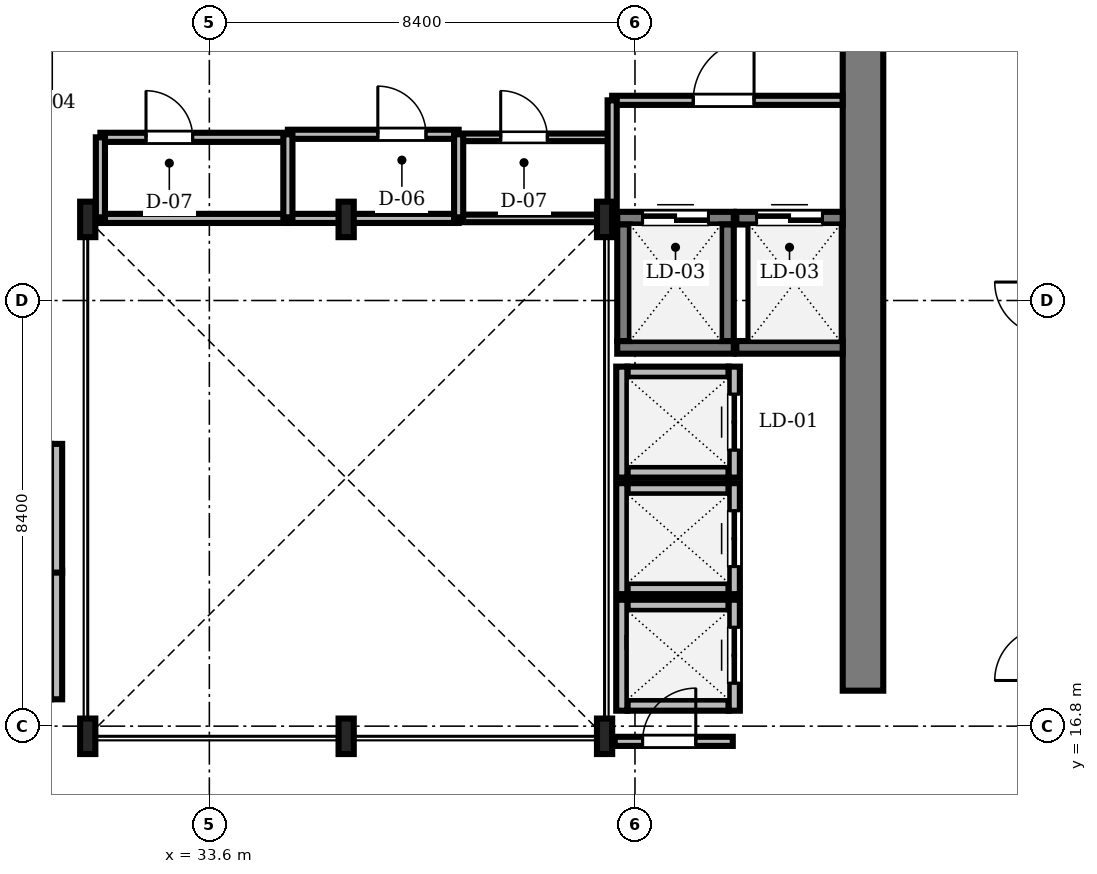
"""IFC4 building model, lengths in metres.
Left out: names, types, materials, properties, quantities, classifications, styles, units other than length and angle.
Written with IfcOpenShell. Run it as: python <this file> out.ifc"""

import sys

from ifc_helpers import new_model, si_unit, direction, frame, frame_2d, origin, origin_2d, place, context, subcontext, project, spatial, rectangle, i_section, extrude, source, transform, mapped, element, fill, save


model = new_model("IFC4")
c1 = context("Model", 3, precision=1e-05, world=origin(), true_north=direction((0.0, 1.0)))
c2 = subcontext(c1, "Body", "Model", "MODEL_VIEW")
j1 = project(units=[si_unit("LENGTHUNIT", "METRE"), si_unit("PLANEANGLEUNIT", "RADIAN")], contexts=[c1])
p1 = place(None, origin())
s1 = spatial("IfcSite", under=j1, at=p1, CompositionType="ELEMENT")
p2 = place(p1, origin())
s2 = spatial("IfcBuilding", under=s1, at=p2, CompositionType="ELEMENT")
p3 = place(p2, frame((0.0, 0.0, 229.8)))
s3 = spatial("IfcBuildingStorey", under=s2, at=p3, CompositionType="ELEMENT", Elevation=229.8)
m1 = source(origin(), c2, "Body", "SweptSolid", [
    extrude(rectangle(XDim=13.15, YDim=0.8, at=frame_2d((6.575, 0.0))), origin(), (0.0, 0.0, 1.0), 3.53),
])
p4 = place(p3, frame((46.5, 17.5, 0.0), z_axis=(0.0, 0.0, 1.0), x_axis=(0.0, 1.0, 0.0)))
e1 = element("IfcWall", 1, at=p4, inside=s3, PredefinedType="SHEAR", context=c2, shape_type="MappedRepresentation", body=[
    mapped(m1, transform((0.0, 0.0, 0.0), scale=1.0)),
])
m2 = source(origin(), c2, "Body", "SweptSolid", [
    extrude(i_section(OverallWidth=0.3, OverallDepth=0.7, WebThickness=0.017, FlangeThickness=0.032, FilletRadius=0.027, at=origin_2d()), origin(), (0.0, 0.0, 1.0), 3.53),
])
for number, where, z_axis, x_axis in (
    (2, (31.2, 16.6, 0.0), (0.0, 0.0, 1.0), (1.0, 0.0, 0.0)),
    (3, (36.3, 16.6, 0.0), (0.0, 0.0, 1.0), (1.0, 0.0, 0.0)),
    (4, (41.4, 16.6, 0.0), (0.0, 0.0, 1.0), (1.0, 0.0, 0.0)),
    (5, (41.4, 26.8, 0.0), (0.0, 0.0, 1.0), (1.0, 0.0, 0.0)),
    (6, (36.3, 26.8, 0.0), (0.0, 0.0, 1.0), (1.0, 0.0, 0.0)),
    (7, (31.2, 26.8, 0.0), (0.0, 0.0, 1.0), (1.0, 0.0, 0.0)),
):
    element("IfcColumn", number, at=place(p3, frame(where, z_axis=z_axis, x_axis=x_axis)), inside=s3, PredefinedType="COLUMN", context=c2, shape_type="MappedRepresentation", body=[
        mapped(m2, transform((0.0, 0.0, 0.0), scale=1.0)),
    ])
m3 = source(origin(), c2, "Body", "SweptSolid", [
    extrude(rectangle(XDim=2.0, YDim=0.22, at=frame_2d((1.0, 0.0))), origin(), (0.0, 0.0, 1.0), 3.53),
])
for number, where, z_axis, x_axis in (
    (8, (41.85, 21.815, 0.0), (0.0, 0.0, 1.0), (1.0, 0.0, 0.0)),
    (9, (41.85, 23.785, 0.0), (0.0, 0.0, 1.0), (1.0, 0.0, 0.0)),
):
    element("IfcWall", number, at=place(p3, frame(where, z_axis=z_axis, x_axis=x_axis)), inside=s3, PredefinedType="SOLIDWALL", context=c2, shape_type="MappedRepresentation", body=[
        mapped(m3, transform((0.0, 0.0, 0.0), scale=1.0)),
    ])
m4 = source(origin(), c2, "Body", "SweptSolid", [
    extrude(rectangle(XDim=2.19, YDim=0.22, at=frame_2d((1.095, 0.0))), origin(), (0.0, 0.0, 1.0), 3.53),
])
p5 = place(p3, frame((41.74, 21.705, 0.0), z_axis=(0.0, 0.0, 1.0), x_axis=(0.0, 1.0, 0.0)))
e10 = element("IfcWall", 10, at=p5, inside=s3, PredefinedType="SOLIDWALL", context=c2, shape_type="MappedRepresentation", body=[
    mapped(m4, transform((0.0, 0.0, 0.0), scale=1.0)),
])
p6 = place(p3, frame((43.96, 21.705, 0.0), z_axis=(0.0, 0.0, 1.0), x_axis=(0.0, 1.0, 0.0)))
e11 = element("IfcWall", 11, at=p6, inside=s3, PredefinedType="SOLIDWALL", context=c2, shape_type="MappedRepresentation", body=[
    mapped(m4, transform((0.0, 0.0, 0.0), scale=1.0)),
])
m5 = source(origin(), c2, "Body", "SweptSolid", [
    extrude(rectangle(XDim=1.1, YDim=2.2, at=frame_2d((0.55, 1.1))), frame((0.0, 0.12, 0.0), z_axis=(0.0, -1.0, 0.0), x_axis=(1.0, 0.0, 0.0)), (0.0, 0.0, 1.0), 0.24),
])
p7 = place(p6, frame((0.545, 0.0, 0.0)))
e12 = element("IfcOpeningElement", 12, at=p7, cuts=e11, PredefinedType="OPENING", context=c2, shape_type="MappedRepresentation", body=[
    mapped(m5, transform((0.0, 0.0, 0.0), scale=1.0)),
])
for number, where, z_axis, x_axis in (
    (13, (41.85, 19.515, 0.0), (0.0, 0.0, 1.0), (1.0, 0.0, 0.0)),
    (14, (41.85, 21.485, 0.0), (0.0, 0.0, 1.0), (1.0, 0.0, 0.0)),
):
    element("IfcWall", number, at=place(p3, frame(where, z_axis=z_axis, x_axis=x_axis)), inside=s3, PredefinedType="SOLIDWALL", context=c2, shape_type="MappedRepresentation", body=[
        mapped(m3, transform((0.0, 0.0, 0.0), scale=1.0)),
    ])
p8 = place(p3, frame((41.74, 19.405, 0.0), z_axis=(0.0, 0.0, 1.0), x_axis=(0.0, 1.0, 0.0)))
e15 = element("IfcWall", 15, at=p8, inside=s3, PredefinedType="SOLIDWALL", context=c2, shape_type="MappedRepresentation", body=[
    mapped(m4, transform((0.0, 0.0, 0.0), scale=1.0)),
])
p9 = place(p3, frame((43.96, 19.405, 0.0), z_axis=(0.0, 0.0, 1.0), x_axis=(0.0, 1.0, 0.0)))
e16 = element("IfcWall", 16, at=p9, inside=s3, PredefinedType="SOLIDWALL", context=c2, shape_type="MappedRepresentation", body=[
    mapped(m4, transform((0.0, 0.0, 0.0), scale=1.0)),
])
p10 = place(p9, frame((0.545, 0.0, 0.0)))
e17 = element("IfcOpeningElement", 17, at=p10, cuts=e16, PredefinedType="OPENING", context=c2, shape_type="MappedRepresentation", body=[
    mapped(m5, transform((0.0, 0.0, 0.0), scale=1.0)),
])
for number, where, z_axis, x_axis in (
    (18, (41.85, 17.215, 0.0), (0.0, 0.0, 1.0), (1.0, 0.0, 0.0)),
    (19, (41.85, 19.185, 0.0), (0.0, 0.0, 1.0), (1.0, 0.0, 0.0)),
):
    element("IfcWall", number, at=place(p3, frame(where, z_axis=z_axis, x_axis=x_axis)), inside=s3, PredefinedType="SOLIDWALL", context=c2, shape_type="MappedRepresentation", body=[
        mapped(m3, transform((0.0, 0.0, 0.0), scale=1.0)),
    ])
p11 = place(p3, frame((41.74, 17.105, 0.0), z_axis=(0.0, 0.0, 1.0), x_axis=(0.0, 1.0, 0.0)))
e20 = element("IfcWall", 20, at=p11, inside=s3, PredefinedType="SOLIDWALL", context=c2, shape_type="MappedRepresentation", body=[
    mapped(m4, transform((0.0, 0.0, 0.0), scale=1.0)),
])
p12 = place(p3, frame((43.96, 17.105, 0.0), z_axis=(0.0, 0.0, 1.0), x_axis=(0.0, 1.0, 0.0)))
e21 = element("IfcWall", 21, at=p12, inside=s3, PredefinedType="SOLIDWALL", context=c2, shape_type="MappedRepresentation", body=[
    mapped(m4, transform((0.0, 0.0, 0.0), scale=1.0)),
])
p13 = place(p12, frame((0.545, 0.0, 0.0)))
e22 = element("IfcOpeningElement", 22, at=p13, cuts=e21, PredefinedType="OPENING", context=c2, shape_type="MappedRepresentation", body=[
    mapped(m5, transform((0.0, 0.0, 0.0), scale=1.0)),
])
m6 = source(origin(), c2, "Body", "SweptSolid", [
    extrude(rectangle(XDim=2.54, YDim=0.22, at=frame_2d((1.27, 0.0))), origin(), (0.0, 0.0, 1.0), 3.53),
])
for number, where, z_axis, x_axis in (
    (23, (30.585, 17.33, 0.0), (0.0, 0.0, 1.0), (0.0, 1.0, 0.0)),
    (24, (30.585, 19.83, 0.0), (0.0, 0.0, 1.0), (0.0, 1.0, 0.0)),
):
    element("IfcWall", number, at=place(p3, frame(where, z_axis=z_axis, x_axis=x_axis)), inside=s3, PredefinedType="SOLIDWALL", context=c2, shape_type="MappedRepresentation", body=[
        mapped(m6, transform((0.0, 0.0, 0.0), scale=1.0)),
    ])
m7 = source(origin(), c2, "Body", "SweptSolid", [
    extrude(rectangle(XDim=2.3, YDim=0.25, at=frame_2d((1.15, 0.0))), origin(), (0.0, 0.0, 1.0), 3.53),
])
p14 = place(p3, frame((41.65, 24.275, 0.0), z_axis=(0.0, 0.0, 1.0), x_axis=(1.0, 0.0, 0.0)))
e25 = element("IfcWall", 25, at=p14, inside=s3, PredefinedType="SOLIDWALL", context=c2, shape_type="MappedRepresentation", body=[
    mapped(m7, transform((0.0, 0.0, 0.0), scale=1.0)),
])
p15 = place(p3, frame((41.65, 26.825, 0.0), z_axis=(0.0, 0.0, 1.0), x_axis=(1.0, 0.0, 0.0)))
e26 = element("IfcWall", 26, at=p15, inside=s3, PredefinedType="SOLIDWALL", context=c2, shape_type="MappedRepresentation", body=[
    mapped(m7, transform((0.0, 0.0, 0.0), scale=1.0)),
])
m8 = source(origin(), c2, "Body", "SweptSolid", [
    extrude(rectangle(XDim=1.3, YDim=2.3, at=frame_2d((0.65, 1.15))), frame((0.0, 0.135, 0.0), z_axis=(0.0, -1.0, 0.0), x_axis=(1.0, 0.0, 0.0)), (0.0, 0.0, 1.0), 0.27),
])
p16 = place(p15, frame((0.5, 0.0, 0.0)))
e27 = element("IfcOpeningElement", 27, at=p16, cuts=e26, PredefinedType="OPENING", context=c2, shape_type="MappedRepresentation", body=[
    mapped(m8, transform((0.0, 0.0, 0.0), scale=1.0)),
])
for number, where, z_axis, x_axis in (
    (28, (41.775, 24.4, 0.0), (0.0, 0.0, 1.0), (0.0, 1.0, 0.0)),
    (29, (43.825, 24.4, 0.0), (0.0, 0.0, 1.0), (0.0, 1.0, 0.0)),
):
    element("IfcWall", number, at=place(p3, frame(where, z_axis=z_axis, x_axis=x_axis)), inside=s3, PredefinedType="SOLIDWALL", context=c2, shape_type="MappedRepresentation", body=[
        mapped(m7, transform((0.0, 0.0, 0.0), scale=1.0)),
    ])
m9 = source(origin(), c2, "Body", "SweptSolid", [
    extrude(rectangle(XDim=2.1, YDim=0.25, at=frame_2d((1.05, 0.0))), origin(), (0.0, 0.0, 1.0), 3.53),
])
p17 = place(p3, frame((44.0, 24.275, 0.0), z_axis=(0.0, 0.0, 1.0), x_axis=(1.0, 0.0, 0.0)))
e30 = element("IfcWall", 30, at=p17, inside=s3, PredefinedType="SOLIDWALL", context=c2, shape_type="MappedRepresentation", body=[
    mapped(m9, transform((0.0, 0.0, 0.0), scale=1.0)),
])
p18 = place(p3, frame((44.0, 26.825, 0.0), z_axis=(0.0, 0.0, 1.0), x_axis=(1.0, 0.0, 0.0)))
e31 = element("IfcWall", 31, at=p18, inside=s3, PredefinedType="SOLIDWALL", context=c2, shape_type="MappedRepresentation", body=[
    mapped(m9, transform((0.0, 0.0, 0.0), scale=1.0)),
])
p19 = place(p18, frame((0.4, 0.0, 0.0)))
e32 = element("IfcOpeningElement", 32, at=p19, cuts=e31, PredefinedType="OPENING", context=c2, shape_type="MappedRepresentation", body=[
    mapped(m8, transform((0.0, 0.0, 0.0), scale=1.0)),
])
m10 = source(origin(), c2, "Body", "SweptSolid", [
    extrude(rectangle(XDim=4.548, YDim=0.18, at=frame_2d((2.274, 0.0))), origin(), (0.0, 0.0, 1.0), 3.162),
])
p20 = place(p3, frame((41.55, 29.15, 0.0), z_axis=(0.0, 0.0, 1.0), x_axis=(1.0, 0.0, 0.0)))
e33 = element("IfcWall", 33, at=p20, inside=s3, PredefinedType="PARTITIONING", context=c2, shape_type="MappedRepresentation", body=[
    mapped(m10, transform((0.0, 0.0, 0.0), scale=1.0)),
])
m11 = source(origin(), c2, "Body", "SweptSolid", [
    extrude(rectangle(XDim=1.2, YDim=2.2, at=frame_2d((0.6, 1.1))), frame((0.0, 0.1, 0.0), z_axis=(0.0, -1.0, 0.0), x_axis=(1.0, 0.0, 0.0)), (0.0, 0.0, 1.0), 0.2),
])
p21 = place(p20, frame((1.6, 0.0, 0.0)))
e34 = element("IfcOpeningElement", 34, at=p21, cuts=e33, PredefinedType="OPENING", context=c2, shape_type="MappedRepresentation", body=[
    mapped(m11, transform((0.0, 0.0, 0.0), scale=1.0)),
])
m12 = source(origin(), c2, "Body", "SweptSolid", [
    extrude(rectangle(XDim=3.7, YDim=0.18, at=frame_2d((1.85, 0.0))), origin(), (0.0, 0.0, 1.0), 3.162),
])
p22 = place(p3, frame((31.45, 28.42, 0.0), z_axis=(0.0, 0.0, 1.0), x_axis=(1.0, 0.0, 0.0)))
e35 = element("IfcWall", 35, at=p22, inside=s3, PredefinedType="PARTITIONING", context=c2, shape_type="MappedRepresentation", body=[
    mapped(m12, transform((0.0, 0.0, 0.0), scale=1.0)),
])
m13 = source(origin(), c2, "Body", "SweptSolid", [
    extrude(rectangle(XDim=0.92, YDim=2.1, at=frame_2d((0.46, 1.05))), frame((0.0, 0.1, 0.0), z_axis=(0.0, -1.0, 0.0), x_axis=(1.0, 0.0, 0.0)), (0.0, 0.0, 1.0), 0.2),
])
p23 = place(p22, frame((0.9, 0.0, 0.0)))
e36 = element("IfcOpeningElement", 36, at=p23, cuts=e35, PredefinedType="OPENING", context=c2, shape_type="MappedRepresentation", body=[
    mapped(m13, transform((0.0, 0.0, 0.0), scale=1.0)),
])
m14 = source(origin(), c2, "Body", "SweptSolid", [
    extrude(rectangle(XDim=3.37, YDim=0.18, at=frame_2d((1.685, 0.0))), origin(), (0.0, 0.0, 1.0), 3.53),
])
p24 = place(p3, frame((35.15, 28.48, 0.0), z_axis=(0.0, 0.0, 1.0), x_axis=(1.0, 0.0, 0.0)))
e37 = element("IfcWall", 37, at=p24, inside=s3, PredefinedType="PARTITIONING", context=c2, shape_type="MappedRepresentation", body=[
    mapped(m14, transform((0.0, 0.0, 0.0), scale=1.0)),
])
m15 = source(origin(), c2, "Body", "SweptSolid", [
    extrude(rectangle(XDim=0.95, YDim=2.15, at=frame_2d((0.475, 1.075))), frame((0.0, 0.1, 0.0), z_axis=(0.0, -1.0, 0.0), x_axis=(1.0, 0.0, 0.0)), (0.0, 0.0, 1.0), 0.2),
])
p25 = place(p24, frame((1.775, 0.0, 0.0)))
e38 = element("IfcOpeningElement", 38, at=p25, cuts=e37, PredefinedType="OPENING", context=c2, shape_type="MappedRepresentation", body=[
    mapped(m15, transform((0.0, 0.0, 0.0), scale=1.0)),
])
m16 = source(origin(), c2, "Body", "SweptSolid", [
    extrude(rectangle(XDim=3.0, YDim=0.15, at=frame_2d((1.5, 0.0))), origin(), (0.0, 0.0, 1.0), 3.53),
])
p26 = place(p3, frame((38.52, 28.42, 0.0), z_axis=(0.0, 0.0, 1.0), x_axis=(1.0, 0.0, 0.0)))
e39 = element("IfcWall", 39, at=p26, inside=s3, PredefinedType="PARTITIONING", context=c2, shape_type="MappedRepresentation", body=[
    mapped(m16, transform((0.0, 0.0, 0.0), scale=1.0)),
])
m17 = source(origin(), c2, "Body", "SweptSolid", [
    extrude(rectangle(XDim=0.92, YDim=2.1, at=frame_2d((0.46, 1.05))), frame((0.0, 0.085, 0.0), z_axis=(0.0, -1.0, 0.0), x_axis=(1.0, 0.0, 0.0)), (0.0, 0.0, 1.0), 0.17),
])
p27 = place(p26, frame((0.83, 0.0, 0.0)))
e40 = element("IfcOpeningElement", 40, at=p27, cuts=e39, PredefinedType="OPENING", context=c2, shape_type="MappedRepresentation", body=[
    mapped(m17, transform((0.0, 0.0, 0.0), scale=1.0)),
])
m18 = source(origin(), c2, "Body", "SweptSolid", [
    extrude(rectangle(XDim=2.33, YDim=0.18, at=frame_2d((1.165, 0.0))), origin(), (0.0, 0.0, 1.0), 2.972),
])
p28 = place(p3, frame((41.6, 16.5, 0.0), z_axis=(0.0, 0.0, 1.0), x_axis=(1.0, 0.0, 0.0)))
e41 = element("IfcWall", 41, at=p28, inside=s3, PredefinedType="PARTITIONING", context=c2, shape_type="MappedRepresentation", body=[
    mapped(m18, transform((0.0, 0.0, 0.0), scale=1.0)),
])
m19 = source(origin(), c2, "Body", "SweptSolid", [
    extrude(rectangle(XDim=1.05, YDim=2.2, at=frame_2d((0.525, 1.1))), frame((0.0, 0.1, 0.0), z_axis=(0.0, -1.0, 0.0), x_axis=(1.0, 0.0, 0.0)), (0.0, 0.0, 1.0), 0.2),
])
p29 = place(p28, frame((0.55, 0.0, 0.0)))
e42 = element("IfcOpeningElement", 42, at=p29, cuts=e41, PredefinedType="OPENING", context=c2, shape_type="MappedRepresentation", body=[
    mapped(m19, transform((0.0, 0.0, 0.0), scale=1.0)),
])
m20 = source(origin(), c2, "Body", "SweptSolid", [
    extrude(rectangle(XDim=3.7, YDim=0.18, at=frame_2d((1.85, 0.0))), origin(), (0.0, 0.0, 1.0), 3.072),
])
p30 = place(p3, frame((31.45, 26.82, 0.0), z_axis=(0.0, 0.0, 1.0), x_axis=(1.0, 0.0, 0.0)))
e43 = element("IfcWall", 43, at=p30, inside=s3, PredefinedType="PARTITIONING", context=c2, shape_type="MappedRepresentation", body=[
    mapped(m20, transform((0.0, 0.0, 0.0), scale=1.0)),
])
m21 = source(origin(), c2, "Body", "SweptSolid", [
    extrude(rectangle(XDim=3.37, YDim=0.18, at=frame_2d((1.685, 0.0))), origin(), (0.0, 0.0, 1.0), 3.072),
])
p31 = place(p3, frame((35.15, 26.82, 0.0), z_axis=(0.0, 0.0, 1.0), x_axis=(1.0, 0.0, 0.0)))
e44 = element("IfcWall", 44, at=p31, inside=s3, PredefinedType="PARTITIONING", context=c2, shape_type="MappedRepresentation", body=[
    mapped(m21, transform((0.0, 0.0, 0.0), scale=1.0)),
])
m22 = source(origin(), c2, "Body", "SweptSolid", [
    extrude(rectangle(XDim=3.0, YDim=0.15, at=frame_2d((1.5, 0.0))), origin(), (0.0, 0.0, 1.0), 2.972),
])
p32 = place(p3, frame((38.52, 26.82, 0.0), z_axis=(0.0, 0.0, 1.0), x_axis=(1.0, 0.0, 0.0)))
e45 = element("IfcWall", 45, at=p32, inside=s3, PredefinedType="PARTITIONING", context=c2, shape_type="MappedRepresentation", body=[
    mapped(m22, transform((0.0, 0.0, 0.0), scale=1.0)),
])
m23 = source(origin(), c2, "Body", "SweptSolid", [
    extrude(rectangle(XDim=2.35, YDim=0.18, at=frame_2d((1.175, 0.0))), origin(), (0.0, 0.0, 1.0), 2.972),
])
p33 = place(p3, frame((41.55, 26.8, 0.0), z_axis=(0.0, 0.0, 1.0), x_axis=(0.0, 1.0, 0.0)))
e46 = element("IfcWall", 46, at=p33, inside=s3, PredefinedType="PARTITIONING", context=c2, shape_type="MappedRepresentation", body=[
    mapped(m23, transform((0.0, 0.0, 0.0), scale=1.0)),
])
m24 = source(origin(), c2, "Body", "SweptSolid", [
    extrude(rectangle(XDim=1.858, YDim=0.18, at=frame_2d((0.929, 0.0))), origin(), (0.0, 0.0, 1.0), 3.53),
])
p34 = place(p3, frame((41.852, 18.45, 0.0), z_axis=(0.0, 0.0, 1.0), x_axis=(1.0, 0.0, 0.0)))
e47 = element("IfcWall", 47, at=p34, inside=s3, PredefinedType="PARTITIONING", context=c2, shape_type="MappedRepresentation", body=[
    mapped(m24, transform((0.0, 0.0, 0.0), scale=1.0)),
])
m25 = source(origin(), c2, "Body", "SweptSolid", [
    extrude(rectangle(XDim=1.66, YDim=0.18, at=frame_2d((0.83, 0.0))), origin(), (0.0, 0.0, 1.0), 3.072),
])
for number, where, z_axis, x_axis in (
    (48, (35.15, 26.82, 0.0), (0.0, 0.0, 1.0), (0.0, 1.0, 0.0)),
    (49, (38.52, 26.82, 0.0), (0.0, 0.0, 1.0), (0.0, 1.0, 0.0)),
):
    element("IfcWall", number, at=place(p3, frame(where, z_axis=z_axis, x_axis=x_axis)), inside=s3, PredefinedType="PARTITIONING", context=c2, shape_type="MappedRepresentation", body=[
        mapped(m25, transform((0.0, 0.0, 0.0), scale=1.0)),
    ])
m26 = source(origin(), c2, "Body", "SweptSolid", [
    extrude(rectangle(XDim=1.6, YDim=0.18, at=frame_2d((0.8, 0.0))), origin(), (0.0, 0.0, 1.0), 3.072),
])
p35 = place(p3, frame((31.45, 26.82, 0.0), z_axis=(0.0, 0.0, 1.0), x_axis=(0.0, 1.0, 0.0)))
e50 = element("IfcWall", 50, at=p35, inside=s3, PredefinedType="PARTITIONING", context=c2, shape_type="MappedRepresentation", body=[
    mapped(m26, transform((0.0, 0.0, 0.0), scale=1.0)),
])
m27 = source(origin(), c2, "Body", "SweptSolid", [
    extrude(rectangle(XDim=1.1, YDim=2.2, at=frame_2d((0.55, 1.1))), frame((0.0, 0.025, 0.0), z_axis=(0.0, -1.0, 0.0), x_axis=(1.0, 0.0, 0.0)), (0.0, 0.0, 1.0), 0.05),
])
p36 = place(p7, origin())
e51 = element("IfcDoor", 51, at=p36, inside=s3, OperationType="DOUBLE_DOOR_SLIDING", PredefinedType="DOOR", context=c2, shape_type="MappedRepresentation", body=[
    mapped(m27, transform((0.0, 0.0, 0.0), scale=1.0)),
])
fill(e12, e51)
p37 = place(p10, origin())
e52 = element("IfcDoor", 52, at=p37, inside=s3, OperationType="DOUBLE_DOOR_SLIDING", PredefinedType="DOOR", context=c2, shape_type="MappedRepresentation", body=[
    mapped(m27, transform((0.0, 0.0, 0.0), scale=1.0)),
])
fill(e17, e52)
p38 = place(p13, origin())
e53 = element("IfcDoor", 53, at=p38, inside=s3, OperationType="DOUBLE_DOOR_SLIDING", PredefinedType="DOOR", context=c2, shape_type="MappedRepresentation", body=[
    mapped(m27, transform((0.0, 0.0, 0.0), scale=1.0)),
])
fill(e22, e53)
m28 = source(origin(), c2, "Body", "SweptSolid", [
    extrude(rectangle(XDim=1.3, YDim=2.3, at=frame_2d((0.65, 1.15))), frame((0.0, 0.025, 0.0), z_axis=(0.0, -1.0, 0.0), x_axis=(1.0, 0.0, 0.0)), (0.0, 0.0, 1.0), 0.05),
])
p39 = place(p16, origin())
e54 = element("IfcDoor", 54, at=p39, inside=s3, OperationType="DOUBLE_DOOR_SLIDING", PredefinedType="DOOR", context=c2, shape_type="MappedRepresentation", body=[
    mapped(m28, transform((0.0, 0.0, 0.0), scale=1.0)),
])
fill(e27, e54)
p40 = place(p19, origin())
e55 = element("IfcDoor", 55, at=p40, inside=s3, OperationType="DOUBLE_DOOR_SLIDING", PredefinedType="DOOR", context=c2, shape_type="MappedRepresentation", body=[
    mapped(m28, transform((0.0, 0.0, 0.0), scale=1.0)),
])
fill(e32, e55)
m29 = source(origin(), c2, "Body", "SweptSolid", [
    extrude(rectangle(XDim=1.2, YDim=2.2, at=frame_2d((0.6, 1.1))), frame((0.0, 0.025, 0.0), z_axis=(0.0, -1.0, 0.0), x_axis=(1.0, 0.0, 0.0)), (0.0, 0.0, 1.0), 0.05),
])
p41 = place(p21, origin())
e56 = element("IfcDoor", 56, at=p41, inside=s3, OperationType="SINGLE_SWING_RIGHT", PredefinedType="DOOR", context=c2, shape_type="MappedRepresentation", body=[
    mapped(m29, transform((0.0, 0.0, 0.0), scale=1.0)),
])
fill(e34, e56)
m30 = source(origin(), c2, "Body", "SweptSolid", [
    extrude(rectangle(XDim=0.92, YDim=2.1, at=frame_2d((0.46, 1.05))), frame((0.0, 0.025, 0.0), z_axis=(0.0, -1.0, 0.0), x_axis=(1.0, 0.0, 0.0)), (0.0, 0.0, 1.0), 0.05),
])
p42 = place(p23, origin())
e57 = element("IfcDoor", 57, at=p42, inside=s3, OperationType="SINGLE_SWING_LEFT", PredefinedType="DOOR", context=c2, shape_type="MappedRepresentation", body=[
    mapped(m30, transform((0.0, 0.0, 0.0), scale=1.0)),
])
fill(e36, e57)
m31 = source(origin(), c2, "Body", "SweptSolid", [
    extrude(rectangle(XDim=0.95, YDim=2.15, at=frame_2d((0.475, 1.075))), frame((0.0, 0.025, 0.0), z_axis=(0.0, -1.0, 0.0), x_axis=(1.0, 0.0, 0.0)), (0.0, 0.0, 1.0), 0.05),
])
p43 = place(p25, origin())
e58 = element("IfcDoor", 58, at=p43, inside=s3, OperationType="SINGLE_SWING_LEFT", PredefinedType="DOOR", context=c2, shape_type="MappedRepresentation", body=[
    mapped(m31, transform((0.0, 0.0, 0.0), scale=1.0)),
])
fill(e38, e58)
p44 = place(p27, origin())
e59 = element("IfcDoor", 59, at=p44, inside=s3, OperationType="SINGLE_SWING_LEFT", PredefinedType="DOOR", context=c2, shape_type="MappedRepresentation", body=[
    mapped(m30, transform((0.0, 0.0, 0.0), scale=1.0)),
])
fill(e40, e59)
m32 = source(origin(), c2, "Body", "SweptSolid", [
    extrude(rectangle(XDim=1.05, YDim=2.2, at=frame_2d((0.525, 1.1))), frame((0.0, 0.025, 0.0), z_axis=(0.0, -1.0, 0.0), x_axis=(1.0, 0.0, 0.0)), (0.0, 0.0, 1.0), 0.05),
])
p45 = place(p29, origin())
e60 = element("IfcDoor", 60, at=p45, inside=s3, OperationType="SINGLE_SWING_RIGHT", PredefinedType="DOOR", context=c2, shape_type="MappedRepresentation", body=[
    mapped(m32, transform((0.0, 0.0, 0.0), scale=1.0)),
])
fill(e42, e60)
save(model, sys.argv[1])
